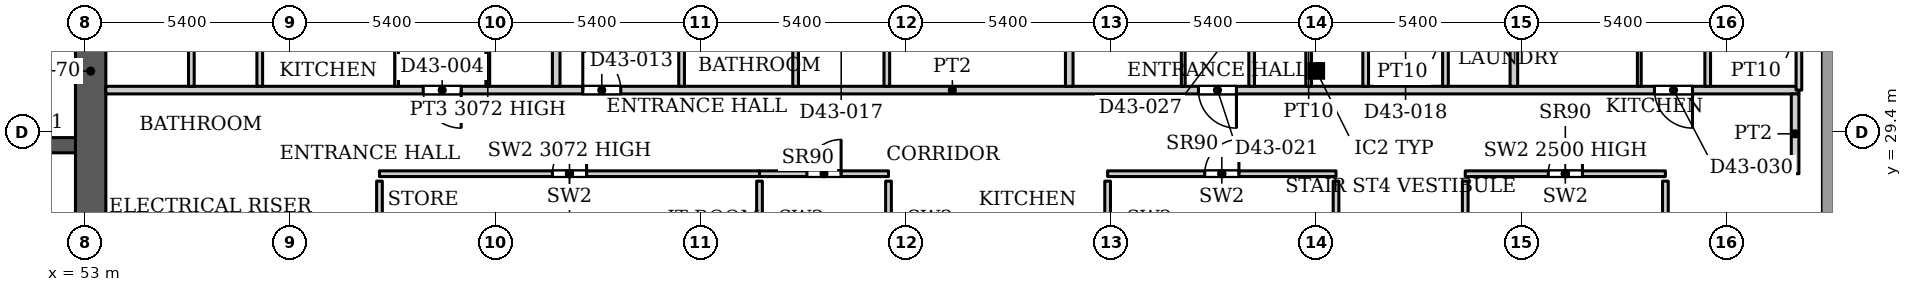
"""IFC4 building model, lengths in metres.
Left out: names, types, materials, properties, quantities, classifications, styles, units other than length and angle.
Written with IfcOpenShell. Run it as: python <this file> out.ifc"""

import sys

from ifc_helpers import new_model, si_unit, direction, frame, frame_2d, origin, origin_2d, place, context, subcontext, project, spatial, rectangle, hollow_rectangle, extrude, source, transform, mapped, element, fill, save


model = new_model("IFC4")
c1 = context("Model", 3, precision=1e-05, world=origin(), true_north=direction((0.0, 1.0)))
c2 = subcontext(c1, "Body", "Model", "MODEL_VIEW")
j1 = project(units=[si_unit("LENGTHUNIT", "METRE"), si_unit("PLANEANGLEUNIT", "RADIAN")], contexts=[c1])
p1 = place(None, origin())
s1 = spatial("IfcSite", under=j1, at=p1, CompositionType="ELEMENT")
p2 = place(p1, origin())
s2 = spatial("IfcBuilding", under=s1, at=p2, CompositionType="ELEMENT")
p3 = place(p2, frame((0.0, 0.0, 183.8)))
s3 = spatial("IfcBuildingStorey", under=s2, at=p3, CompositionType="ELEMENT", Elevation=183.8)
p4 = place(p3, frame((85.4, 31.005, 0.0), z_axis=(0.0, 0.0, 1.0), x_axis=(1.0, 0.0, 0.0)))
e1 = element("IfcColumn", 1, at=p4, inside=s3, PredefinedType="COLUMN", context=c2, shape_type="SweptSolid", body=[
    extrude(hollow_rectangle(XDim=0.305, YDim=0.305, WallThickness=0.016, InnerFilletRadius=0.016, OuterFilletRadius=0.032, at=origin_2d()), origin(), (0.0, 0.0, 1.0), 3.9),
])
p5 = place(p3, frame((34.75, 29.05, 0.0), z_axis=(0.0, 0.0, 1.0), x_axis=(1.0, 0.0, 0.0)))
e2 = element("IfcWall", 2, at=p5, inside=s3, PredefinedType="SHEAR", context=c2, shape_type="SweptSolid", body=[
    extrude(rectangle(XDim=18.4, YDim=0.4, at=frame_2d((9.2, 0.0))), origin(), (0.0, 0.0, 1.0), 3.9),
])
p6 = place(p5, frame((0.875, 0.0, 0.0)))
e3 = element("IfcOpeningElement", 3, at=p6, cuts=e2, PredefinedType="OPENING", context=c2, shape_type="SweptSolid", body=[
    extrude(rectangle(XDim=1.1, YDim=2.2, at=frame_2d((0.55, 1.1))), frame((0.0, 0.21, 0.0), z_axis=(0.0, -1.0, 0.0), x_axis=(1.0, 0.0, 0.0)), (0.0, 0.0, 1.0), 0.42),
])
p7 = place(p5, frame((3.725, 0.0, 0.0)))
e4 = element("IfcOpeningElement", 4, at=p7, cuts=e2, PredefinedType="OPENING", context=c2, shape_type="SweptSolid", body=[
    extrude(rectangle(XDim=1.1, YDim=2.2, at=frame_2d((0.55, 1.1))), frame((0.0, 0.21, 0.0), z_axis=(0.0, -1.0, 0.0), x_axis=(1.0, 0.0, 0.0)), (0.0, 0.0, 1.0), 0.42),
])
p8 = place(p5, frame((6.575, 0.0, 0.0)))
e5 = element("IfcOpeningElement", 5, at=p8, cuts=e2, PredefinedType="OPENING", context=c2, shape_type="SweptSolid", body=[
    extrude(rectangle(XDim=1.1, YDim=2.2, at=frame_2d((0.55, 1.1))), frame((0.0, 0.21, 0.0), z_axis=(0.0, -1.0, 0.0), x_axis=(1.0, 0.0, 0.0)), (0.0, 0.0, 1.0), 0.42),
])
p9 = place(p5, frame((9.425, 0.0, 0.0)))
e6 = element("IfcOpeningElement", 6, at=p9, cuts=e2, PredefinedType="OPENING", context=c2, shape_type="SweptSolid", body=[
    extrude(rectangle(XDim=1.1, YDim=2.2, at=frame_2d((0.55, 1.1))), frame((0.0, 0.21, 0.0), z_axis=(0.0, -1.0, 0.0), x_axis=(1.0, 0.0, 0.0)), (0.0, 0.0, 1.0), 0.42),
])
p10 = place(p5, frame((12.275, 0.0, 0.0)))
e7 = element("IfcOpeningElement", 7, at=p10, cuts=e2, PredefinedType="OPENING", context=c2, shape_type="SweptSolid", body=[
    extrude(rectangle(XDim=1.1, YDim=2.2, at=frame_2d((0.55, 1.1))), frame((0.0, 0.21, 0.0), z_axis=(0.0, -1.0, 0.0), x_axis=(1.0, 0.0, 0.0)), (0.0, 0.0, 1.0), 0.42),
])
p11 = place(p5, frame((15.125, 0.0, 0.0)))
e8 = element("IfcOpeningElement", 8, at=p11, cuts=e2, PredefinedType="OPENING", context=c2, shape_type="SweptSolid", body=[
    extrude(rectangle(XDim=1.1, YDim=2.2, at=frame_2d((0.55, 1.1))), frame((0.0, 0.21, 0.0), z_axis=(0.0, -1.0, 0.0), x_axis=(1.0, 0.0, 0.0)), (0.0, 0.0, 1.0), 0.42),
])
p12 = place(p3, frame((53.15, 25.8, 0.0), z_axis=(0.0, 0.0, 1.0), x_axis=(0.0, 1.0, 0.0)))
e9 = element("IfcWall", 9, at=p12, inside=s3, PredefinedType="SHEAR", context=c2, shape_type="SweptSolid", body=[
    extrude(rectangle(XDim=10.4, YDim=0.8, at=frame_2d((5.2, 0.0))), origin(), (0.0, 0.0, 1.0), 3.9),
])
p13 = place(p3, frame((60.75, 28.3, 0.0), z_axis=(0.0, 0.0, 1.0), x_axis=(1.0, 0.0, 0.0)))
e10 = element("IfcWall", 10, at=p13, inside=s3, PredefinedType="PARTITIONING", context=c2, shape_type="SweptSolid", body=[
    extrude(rectangle(XDim=10.0, YDim=0.15, at=frame_2d((5.0, 0.0))), origin(), (0.0, 0.0, 1.0), 3.072),
])
p14 = place(p13, frame((4.55, 0.0, 0.0)))
e11 = element("IfcOpeningElement", 11, at=p14, cuts=e10, PredefinedType="OPENING", context=c2, shape_type="SweptSolid", body=[
    extrude(rectangle(XDim=0.9, YDim=2.2, at=frame_2d((0.45, 1.1))), frame((0.0, 0.085, 0.0), z_axis=(0.0, -1.0, 0.0), x_axis=(1.0, 0.0, 0.0)), (0.0, 0.0, 1.0), 0.17),
])
p15 = place(p3, frame((60.75, 23.075, 0.0), z_axis=(0.0, 0.0, 1.0), x_axis=(0.0, 1.0, 0.0)))
e12 = element("IfcWall", 12, at=p15, inside=s3, PredefinedType="PARTITIONING", context=c2, shape_type="SweptSolid", body=[
    extrude(rectangle(XDim=5.03, YDim=0.15, at=frame_2d((2.515, 0.0))), origin(), (0.0, 0.0, 1.0), 3.9),
])
p16 = place(p3, frame((70.75, 26.12, 0.0), z_axis=(0.0, 0.0, 1.0), x_axis=(0.0, 1.0, 0.0)))
e13 = element("IfcWall", 13, at=p16, inside=s3, PredefinedType="PARTITIONING", context=c2, shape_type="SweptSolid", body=[
    extrude(rectangle(XDim=1.985, YDim=0.15, at=frame_2d((0.992, 0.0))), origin(), (0.0, 0.0, 1.0), 3.9),
])
p17 = place(p3, frame((70.75, 28.3, 0.0), z_axis=(0.0, 0.0, 1.0), x_axis=(1.0, 0.0, 0.0)))
e14 = element("IfcWall", 14, at=p17, inside=s3, PredefinedType="PARTITIONING", context=c2, shape_type="SweptSolid", body=[
    extrude(rectangle(XDim=3.394, YDim=0.15, at=frame_2d((1.697, 0.0))), origin(), (0.0, 0.0, 1.0), 3.9),
])
p18 = place(p17, frame((1.247, 0.0, 0.0)))
e15 = element("IfcOpeningElement", 15, at=p18, cuts=e14, PredefinedType="OPENING", context=c2, shape_type="SweptSolid", body=[
    extrude(rectangle(XDim=0.9, YDim=2.2, at=frame_2d((0.45, 1.1))), frame((0.0, 0.085, 0.0), z_axis=(0.0, -1.0, 0.0), x_axis=(1.0, 0.0, 0.0)), (0.0, 0.0, 1.0), 0.17),
])
p19 = place(p3, frame((74.144, 26.12, 0.0), z_axis=(0.0, 0.0, 1.0), x_axis=(0.0, 1.0, 0.0)))
e16 = element("IfcWall", 16, at=p19, inside=s3, PredefinedType="PARTITIONING", context=c2, shape_type="SweptSolid", body=[
    extrude(rectangle(XDim=1.985, YDim=0.15, at=frame_2d((0.992, 0.0))), origin(), (0.0, 0.0, 1.0), 3.9),
])
p20 = place(p3, frame((79.91, 28.3, 0.0), z_axis=(0.0, 0.0, 1.0), x_axis=(1.0, 0.0, 0.0)))
e17 = element("IfcWall", 17, at=p20, inside=s3, PredefinedType="PARTITIONING", context=c2, shape_type="SweptSolid", body=[
    extrude(rectangle(XDim=6.01, YDim=0.15, at=frame_2d((3.005, 0.0))), origin(), (0.0, 0.0, 1.0), 3.9),
])
p21 = place(p20, frame((2.555, 0.0, 0.0)))
e18 = element("IfcOpeningElement", 18, at=p21, cuts=e17, PredefinedType="OPENING", context=c2, shape_type="SweptSolid", body=[
    extrude(rectangle(XDim=0.9, YDim=2.2, at=frame_2d((0.45, 1.1))), frame((0.0, 0.085, 0.0), z_axis=(0.0, -1.0, 0.0), x_axis=(1.0, 0.0, 0.0)), (0.0, 0.0, 1.0), 0.17),
])
p22 = place(p3, frame((79.91, 26.12, 0.0), z_axis=(0.0, 0.0, 1.0), x_axis=(0.0, 1.0, 0.0)))
e19 = element("IfcWall", 19, at=p22, inside=s3, PredefinedType="PARTITIONING", context=c2, shape_type="SweptSolid", body=[
    extrude(rectangle(XDim=1.985, YDim=0.15, at=frame_2d((0.992, 0.0))), origin(), (0.0, 0.0, 1.0), 3.9),
])
p23 = place(p3, frame((85.92, 25.62, 0.0), z_axis=(0.0, 0.0, 1.0), x_axis=(0.0, 1.0, 0.0)))
e20 = element("IfcWall", 20, at=p23, inside=s3, PredefinedType="PARTITIONING", context=c2, shape_type="SweptSolid", body=[
    extrude(rectangle(XDim=2.485, YDim=0.15, at=frame_2d((1.242, 0.0))), origin(), (0.0, 0.0, 1.0), 3.9),
])
p24 = place(p3, frame((89.32, 28.3, 0.0), z_axis=(0.0, 0.0, 1.0), x_axis=(1.0, 0.0, 0.0)))
e21 = element("IfcWall", 21, at=p24, inside=s3, PredefinedType="PARTITIONING", context=c2, shape_type="SweptSolid", body=[
    extrude(rectangle(XDim=5.267, YDim=0.15, at=frame_2d((2.633, 0.0))), origin(), (0.0, 0.0, 1.0), 2.5),
])
p25 = place(p24, frame((2.184, 0.0, 0.0)))
e22 = element("IfcOpeningElement", 22, at=p25, cuts=e21, PredefinedType="OPENING", context=c2, shape_type="SweptSolid", body=[
    extrude(rectangle(XDim=0.9, YDim=2.2, at=frame_2d((0.45, 1.1))), frame((0.0, 0.085, 0.0), z_axis=(0.0, -1.0, 0.0), x_axis=(1.0, 0.0, 0.0)), (0.0, 0.0, 1.0), 0.17),
])
p26 = place(p3, frame((89.32, 25.62, 0.0), z_axis=(0.0, 0.0, 1.0), x_axis=(0.0, 1.0, 0.0)))
e23 = element("IfcWall", 23, at=p26, inside=s3, PredefinedType="PARTITIONING", context=c2, shape_type="SweptSolid", body=[
    extrude(rectangle(XDim=2.485, YDim=0.15, at=frame_2d((1.242, 0.0))), origin(), (0.0, 0.0, 1.0), 3.9),
])
p27 = place(p3, frame((94.587, 21.293, 0.0), z_axis=(0.0, 0.0, 1.0), x_axis=(0.0, 1.0, 0.0)))
e24 = element("IfcWall", 24, at=p27, inside=s3, PredefinedType="PARTITIONING", context=c2, shape_type="SweptSolid", body=[
    extrude(rectangle(XDim=6.812, YDim=0.15, at=frame_2d((3.406, 0.0))), origin(), (0.0, 0.0, 1.0), 3.9),
])
p28 = place(p3, frame((53.549, 30.5, 0.0), z_axis=(0.0, 0.0, 1.0), x_axis=(1.0, 0.0, 0.0)))
e25 = element("IfcWall", 25, at=p28, inside=s3, PredefinedType="PARTITIONING", context=c2, shape_type="SweptSolid", body=[
    extrude(rectangle(XDim=44.551, YDim=0.2, at=frame_2d((22.275, 0.0))), origin(), (0.0, 0.0, 1.0), 3.6),
])
p29 = place(p28, frame((8.351, 0.0, 0.0)))
e26 = element("IfcOpeningElement", 26, at=p29, cuts=e25, PredefinedType="OPENING", context=c2, shape_type="SweptSolid", body=[
    extrude(rectangle(XDim=1.0, YDim=2.1, at=frame_2d((0.5, 1.05))), frame((0.0, 0.11, 0.0), z_axis=(0.0, -1.0, 0.0), x_axis=(1.0, 0.0, 0.0)), (0.0, 0.0, 1.0), 0.22),
])
p30 = place(p28, frame((12.551, 0.0, 0.0)))
e27 = element("IfcOpeningElement", 27, at=p30, cuts=e25, PredefinedType="OPENING", context=c2, shape_type="SweptSolid", body=[
    extrude(rectangle(XDim=1.0, YDim=2.1, at=frame_2d((0.5, 1.05))), frame((0.0, 0.11, 0.0), z_axis=(0.0, -1.0, 0.0), x_axis=(1.0, 0.0, 0.0)), (0.0, 0.0, 1.0), 0.22),
])
p31 = place(p28, frame((28.751, 0.0, 0.0)))
e28 = element("IfcOpeningElement", 28, at=p31, cuts=e25, PredefinedType="OPENING", context=c2, shape_type="SweptSolid", body=[
    extrude(rectangle(XDim=1.0, YDim=2.1, at=frame_2d((0.5, 1.05))), frame((0.0, 0.11, 0.0), z_axis=(0.0, -1.0, 0.0), x_axis=(1.0, 0.0, 0.0)), (0.0, 0.0, 1.0), 0.22),
])
p32 = place(p28, frame((40.751, 0.0, 0.0)))
e29 = element("IfcOpeningElement", 29, at=p32, cuts=e25, PredefinedType="OPENING", context=c2, shape_type="SweptSolid", body=[
    extrude(rectangle(XDim=1.0, YDim=2.1, at=frame_2d((0.5, 1.05))), frame((0.0, 0.11, 0.0), z_axis=(0.0, -1.0, 0.0), x_axis=(1.0, 0.0, 0.0)), (0.0, 0.0, 1.0), 0.22),
])
for number, where, z_axis, x_axis in (
    (30, (55.8, 30.6, 0.0), (0.0, 0.0, 1.0), (0.0, 1.0, 0.0)),
    (31, (57.6, 30.6, 0.0), (0.0, 0.0, 1.0), (0.0, 1.0, 0.0)),
):
    element("IfcWall", number, at=place(p3, frame(where, z_axis=z_axis, x_axis=x_axis)), inside=s3, PredefinedType="PARTITIONING", context=c2, shape_type="SweptSolid", body=[
        extrude(rectangle(XDim=3.025, YDim=0.15, at=frame_2d((1.512, 0.0))), origin(), (0.0, 0.0, 1.0), 3.6),
    ])
p33 = place(p3, frame((61.2, 30.6, 0.0), z_axis=(0.0, 0.0, 1.0), x_axis=(0.0, 1.0, 0.0)))
e32 = element("IfcWall", 32, at=p33, inside=s3, PredefinedType="PARTITIONING", context=c2, shape_type="SweptSolid", body=[
    extrude(rectangle(XDim=3.025, YDim=0.1, at=frame_2d((1.512, 0.0))), origin(), (0.0, 0.0, 1.0), 3.6),
])
p34 = place(p3, frame((63.6, 30.6, 0.0), z_axis=(0.0, 0.0, 1.0), x_axis=(0.0, 1.0, 0.0)))
e33 = element("IfcWall", 33, at=p34, inside=s3, PredefinedType="PARTITIONING", context=c2, shape_type="SweptSolid", body=[
    extrude(rectangle(XDim=3.15, YDim=0.1, at=frame_2d((1.575, 0.0))), origin(), (0.0, 0.0, 1.0), 3.072),
])
p35 = place(p3, frame((65.4, 30.6, 0.0), z_axis=(0.0, 0.0, 1.0), x_axis=(0.0, 1.0, 0.0)))
e34 = element("IfcWall", 34, at=p35, inside=s3, PredefinedType="PARTITIONING", context=c2, shape_type="SweptSolid", body=[
    extrude(rectangle(XDim=13.3, YDim=0.2, at=frame_2d((6.65, 0.0))), origin(), (0.0, 0.0, 1.0), 3.6),
])
for number, where, z_axis, x_axis in (
    (35, (68.7, 30.6, 0.0), (0.0, 0.0, 1.0), (0.0, 1.0, 0.0)),
    (36, (71.7, 30.6, 0.0), (0.0, 0.0, 1.0), (0.0, 1.0, 0.0)),
    (37, (74.1, 30.6, 0.0), (0.0, 0.0, 1.0), (0.0, 1.0, 0.0)),
):
    element("IfcWall", number, at=place(p3, frame(where, z_axis=z_axis, x_axis=x_axis)), inside=s3, PredefinedType="PARTITIONING", context=c2, shape_type="SweptSolid", body=[
        extrude(rectangle(XDim=3.025, YDim=0.15, at=frame_2d((1.512, 0.0))), origin(), (0.0, 0.0, 1.0), 3.6),
    ])
p36 = place(p3, frame((78.9, 30.6, 0.0), z_axis=(0.0, 0.0, 1.0), x_axis=(0.0, 1.0, 0.0)))
e38 = element("IfcWall", 38, at=p36, inside=s3, PredefinedType="PARTITIONING", context=c2, shape_type="SweptSolid", body=[
    extrude(rectangle(XDim=13.3, YDim=0.2, at=frame_2d((6.65, 0.0))), origin(), (0.0, 0.0, 1.0), 3.6),
])
p37 = place(p3, frame((81.9, 30.6, 0.0), z_axis=(0.0, 0.0, 1.0), x_axis=(0.0, 1.0, 0.0)))
e39 = element("IfcWall", 39, at=p37, inside=s3, PredefinedType="PARTITIONING", context=c2, shape_type="SweptSolid", body=[
    extrude(rectangle(XDim=3.025, YDim=0.1, at=frame_2d((1.512, 0.0))), origin(), (0.0, 0.0, 1.0), 3.6),
])
p38 = place(p3, frame((83.7, 30.6, 0.0), z_axis=(0.0, 0.0, 1.0), x_axis=(0.0, 1.0, 0.0)))
e40 = element("IfcWall", 40, at=p38, inside=s3, PredefinedType="PARTITIONING", context=c2, shape_type="SweptSolid", body=[
    extrude(rectangle(XDim=3.025, YDim=0.15, at=frame_2d((1.512, 0.0))), origin(), (0.0, 0.0, 1.0), 3.6),
])
p39 = place(p3, frame((85.2, 30.6, 0.0), z_axis=(0.0, 0.0, 1.0), x_axis=(0.0, 1.0, 0.0)))
e41 = element("IfcWall", 41, at=p39, inside=s3, PredefinedType="PARTITIONING", context=c2, shape_type="SweptSolid", body=[
    extrude(rectangle(XDim=3.025, YDim=0.15, at=frame_2d((1.512, 0.0))), origin(), (0.0, 0.0, 1.0), 3.447),
])
for number, where, z_axis, x_axis in (
    (42, (86.7, 30.6, 0.0), (0.0, 0.0, 1.0), (0.0, 1.0, 0.0)),
    (43, (88.8, 30.6, 0.0), (0.0, 0.0, 1.0), (0.0, 1.0, 0.0)),
):
    element("IfcWall", number, at=place(p3, frame(where, z_axis=z_axis, x_axis=x_axis)), inside=s3, PredefinedType="PARTITIONING", context=c2, shape_type="SweptSolid", body=[
        extrude(rectangle(XDim=3.025, YDim=0.15, at=frame_2d((1.512, 0.0))), origin(), (0.0, 0.0, 1.0), 3.6),
    ])
p40 = place(p3, frame((90.6, 30.6, 0.0), z_axis=(0.0, 0.0, 1.0), x_axis=(0.0, 1.0, 0.0)))
e44 = element("IfcWall", 44, at=p40, inside=s3, PredefinedType="PARTITIONING", context=c2, shape_type="SweptSolid", body=[
    extrude(rectangle(XDim=13.3, YDim=0.2, at=frame_2d((6.65, 0.0))), origin(), (0.0, 0.0, 1.0), 2.5),
])
p41 = place(p3, frame((93.9, 30.6, 0.0), z_axis=(0.0, 0.0, 1.0), x_axis=(0.0, 1.0, 0.0)))
e45 = element("IfcWall", 45, at=p41, inside=s3, PredefinedType="PARTITIONING", context=c2, shape_type="SweptSolid", body=[
    extrude(rectangle(XDim=3.025, YDim=0.1, at=frame_2d((1.512, 0.0))), origin(), (0.0, 0.0, 1.0), 3.6),
])
p42 = place(p3, frame((95.7, 30.6, 0.0), z_axis=(0.0, 0.0, 1.0), x_axis=(0.0, 1.0, 0.0)))
e46 = element("IfcWall", 46, at=p42, inside=s3, PredefinedType="PARTITIONING", context=c2, shape_type="SweptSolid", body=[
    extrude(rectangle(XDim=3.175, YDim=0.15, at=frame_2d((1.587, 0.0))), origin(), (0.0, 0.0, 1.0), 3.6),
])
p43 = place(p3, frame((98.0, 28.3, 0.0), z_axis=(0.0, 0.0, 1.0), x_axis=(0.0, 1.0, 0.0)))
e47 = element("IfcWall", 47, at=p43, inside=s3, PredefinedType="PARTITIONING", context=c2, shape_type="SweptSolid", body=[
    extrude(rectangle(XDim=2.1, YDim=0.2, at=frame_2d((1.05, 0.0))), origin(), (0.0, 0.0, 1.0), 3.6),
])
p44 = place(p3, frame((98.1, 30.5, 0.0), z_axis=(0.0, 0.0, 1.0), x_axis=(0.0, 1.0, 0.0)))
e48 = element("IfcWall", 48, at=p44, inside=s3, PredefinedType="PARTITIONING", context=c2, shape_type="SweptSolid", body=[
    extrude(rectangle(XDim=3.275, YDim=0.15, at=frame_2d((1.637, 0.0))), origin(), (0.0, 0.0, 1.0), 3.6),
])
m1 = source(origin(), c2, "Body", "SweptSolid", [
    extrude(rectangle(XDim=0.9, YDim=2.2, at=frame_2d((0.45, 1.1))), frame((0.0, 0.025, 0.0), z_axis=(0.0, -1.0, 0.0), x_axis=(1.0, 0.0, 0.0)), (0.0, 0.0, 1.0), 0.05),
])
p45 = place(p14, origin())
e49 = element("IfcDoor", 49, at=p45, inside=s3, OperationType="SINGLE_SWING_LEFT", PredefinedType="DOOR", context=c2, shape_type="MappedRepresentation", body=[
    mapped(m1, transform((0.0, 0.0, 0.0), x_axis=(1.0, 0.0, 0.0), y_axis=(0.0, 1.0, 0.0), z_axis=(0.0, 0.0, 1.0), scale=1.0)),
])
fill(e11, e49)
p46 = place(p18, origin())
e50 = element("IfcDoor", 50, at=p46, inside=s3, OperationType="SINGLE_SWING_LEFT", PredefinedType="DOOR", context=c2, shape_type="MappedRepresentation", body=[
    mapped(m1, transform((0.0, 0.0, 0.0), x_axis=(1.0, 0.0, 0.0), y_axis=(0.0, 1.0, 0.0), z_axis=(0.0, 0.0, 1.0), scale=1.0)),
])
fill(e15, e50)
p47 = place(p21, origin())
e51 = element("IfcDoor", 51, at=p47, inside=s3, OperationType="SINGLE_SWING_LEFT", PredefinedType="DOOR", context=c2, shape_type="MappedRepresentation", body=[
    mapped(m1, transform((0.0, 0.0, 0.0), x_axis=(1.0, 0.0, 0.0), y_axis=(0.0, 1.0, 0.0), z_axis=(0.0, 0.0, 1.0), scale=1.0)),
])
fill(e18, e51)
p48 = place(p25, origin())
e52 = element("IfcDoor", 52, at=p48, inside=s3, OperationType="SINGLE_SWING_LEFT", PredefinedType="DOOR", context=c2, shape_type="MappedRepresentation", body=[
    mapped(m1, transform((0.0, 0.0, 0.0), x_axis=(1.0, 0.0, 0.0), y_axis=(0.0, 1.0, 0.0), z_axis=(0.0, 0.0, 1.0), scale=1.0)),
])
fill(e22, e52)
m2 = source(origin(), c2, "Body", "SweptSolid", [
    extrude(rectangle(XDim=1.0, YDim=2.1, at=frame_2d((0.5, 1.05))), frame((0.0, 0.025, 0.0), z_axis=(0.0, -1.0, 0.0), x_axis=(1.0, 0.0, 0.0)), (0.0, 0.0, 1.0), 0.05),
])
p49 = place(p29, origin())
e53 = element("IfcDoor", 53, at=p49, inside=s3, OperationType="SINGLE_SWING_RIGHT", PredefinedType="DOOR", context=c2, shape_type="MappedRepresentation", body=[
    mapped(m2, transform((0.0, 0.0, 0.0), x_axis=(1.0, 0.0, 0.0), y_axis=(0.0, 1.0, 0.0), z_axis=(0.0, 0.0, 1.0), scale=1.0)),
])
fill(e26, e53)
p50 = place(p30, origin())
e54 = element("IfcDoor", 54, at=p50, inside=s3, OperationType="SINGLE_SWING_LEFT", PredefinedType="DOOR", context=c2, shape_type="MappedRepresentation", body=[
    mapped(m2, transform((0.0, 0.0, 0.0), x_axis=(1.0, 0.0, 0.0), y_axis=(0.0, 1.0, 0.0), z_axis=(0.0, 0.0, 1.0), scale=1.0)),
])
fill(e27, e54)
p51 = place(p31, origin())
e55 = element("IfcDoor", 55, at=p51, inside=s3, OperationType="SINGLE_SWING_RIGHT", PredefinedType="DOOR", context=c2, shape_type="MappedRepresentation", body=[
    mapped(m2, transform((0.0, 0.0, 0.0), x_axis=(1.0, 0.0, 0.0), y_axis=(0.0, 1.0, 0.0), z_axis=(0.0, 0.0, 1.0), scale=1.0)),
])
fill(e28, e55)
p52 = place(p32, origin())
e56 = element("IfcDoor", 56, at=p52, inside=s3, OperationType="SINGLE_SWING_RIGHT", PredefinedType="DOOR", context=c2, shape_type="MappedRepresentation", body=[
    mapped(m2, transform((0.0, 0.0, 0.0), x_axis=(1.0, 0.0, 0.0), y_axis=(0.0, 1.0, 0.0), z_axis=(0.0, 0.0, 1.0), scale=1.0)),
])
fill(e29, e56)
save(model, sys.argv[1])
